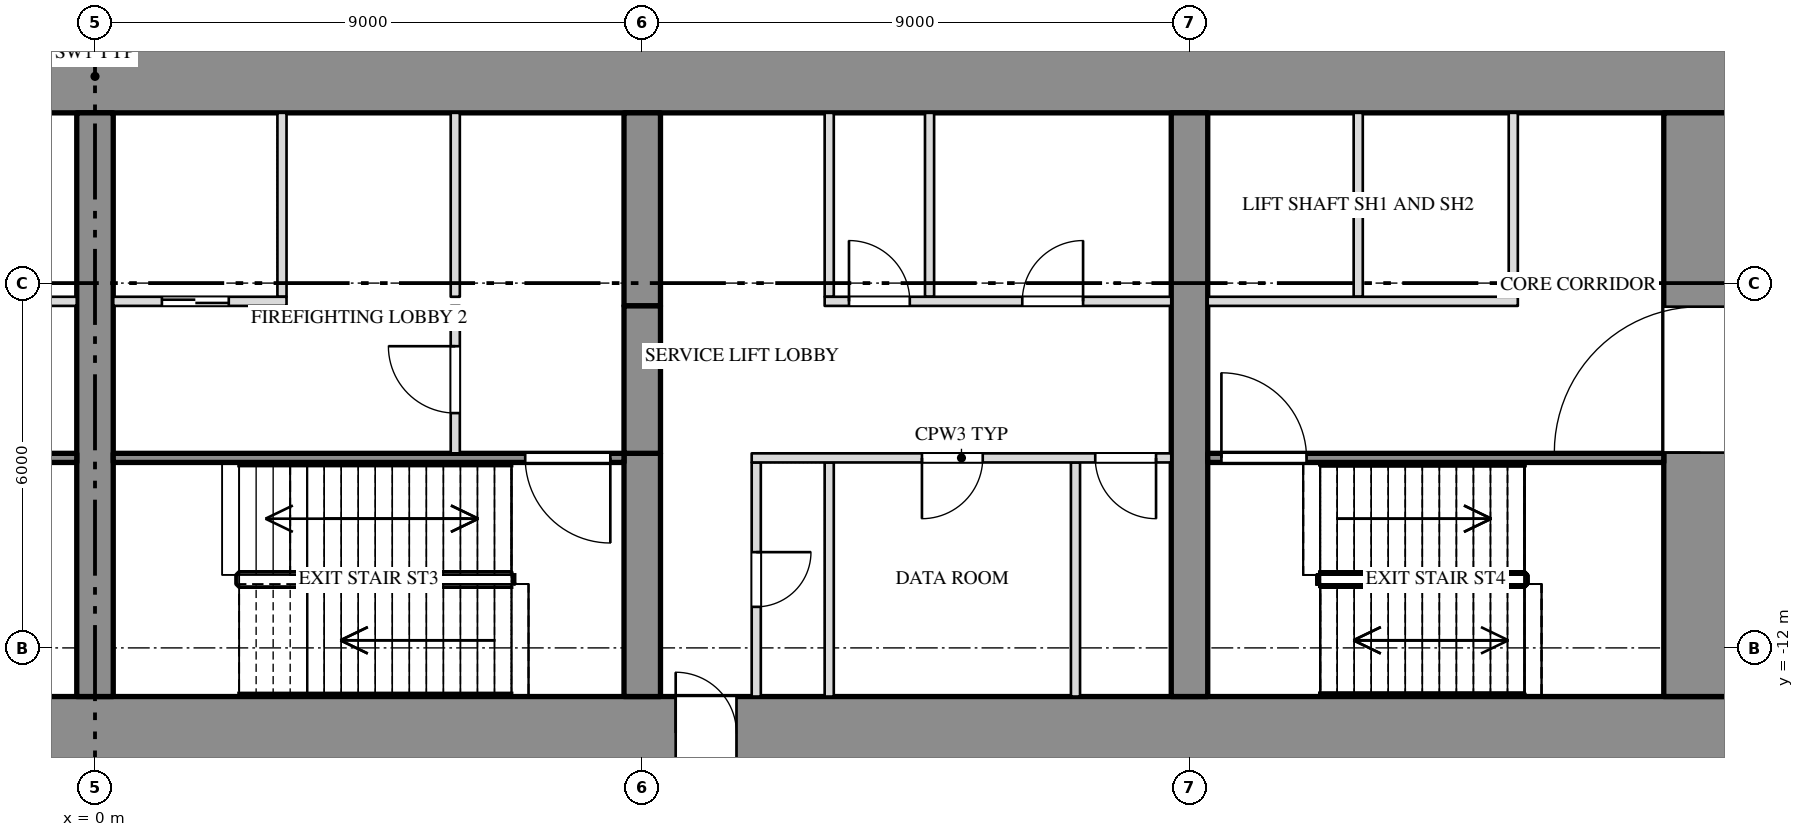
"""IFC4 building model, lengths in metres.
Left out: names, types, materials, properties, quantities, classifications, styles, units other than length and angle.
Written with IfcOpenShell. Run it as: python <this file> out.ifc"""

import sys

from ifc_helpers import new_model, si_unit, direction, frame, frame_2d, origin, place, context, subcontext, project, spatial, rectangle, extrude, element, fill, save


model = new_model("IFC4")
c1 = context("Model", 3, precision=1e-05, world=origin(), true_north=direction((0.0, 1.0)))
c2 = subcontext(c1, "Body", "Model", "MODEL_VIEW")
j1 = project(units=[si_unit("LENGTHUNIT", "METRE"), si_unit("PLANEANGLEUNIT", "RADIAN")], contexts=[c1])
p1 = place(None, origin())
s1 = spatial("IfcSite", under=j1, at=p1, CompositionType="ELEMENT")
p2 = place(p1, origin())
s2 = spatial("IfcBuilding", under=s1, at=p2, CompositionType="ELEMENT")
p3 = place(p2, frame((0.0, 0.0, 9.0)))
s3 = spatial("IfcBuildingStorey", under=s2, at=p3, CompositionType="ELEMENT", Elevation=9.0)
p4 = place(p3, frame((-27.0, -2.6, 0.0), z_axis=(0.0, 0.0, 1.0), x_axis=(1.0, 0.0, 0.0)))
e1 = element("IfcWall", 1, at=p4, inside=s3, PredefinedType="SHEAR", context=c2, shape_type="SweptSolid", body=[
    extrude(rectangle(XDim=54.0, YDim=1.2, at=frame_2d((27.0, 0.0))), origin(), (0.0, 0.0, 1.0), 5.7),
])
p5 = place(p3, frame((-27.0, -13.4, 0.0), z_axis=(0.0, 0.0, 1.0), x_axis=(1.0, 0.0, 0.0)))
e2 = element("IfcWall", 2, at=p5, inside=s3, PredefinedType="SHEAR", context=c2, shape_type="SweptSolid", body=[
    extrude(rectangle(XDim=54.0, YDim=1.2, at=frame_2d((27.0, 0.0))), origin(), (0.0, 0.0, 1.0), 5.7),
])
p6 = place(p5, frame((16.45, 0.0, 0.0)))
e3 = element("IfcOpeningElement", 3, at=p6, cuts=e2, PredefinedType="OPENING", context=c2, shape_type="SweptSolid", body=[
    extrude(rectangle(XDim=1.0, YDim=2.1, at=frame_2d((0.5, 1.05))), frame((0.0, 0.612, 0.0), z_axis=(0.0, -1.0, 0.0), x_axis=(1.0, 0.0, 0.0)), (0.0, 0.0, 1.0), 1.224),
])
p7 = place(p5, frame((36.55, 0.0, 0.0)))
e4 = element("IfcOpeningElement", 4, at=p7, cuts=e2, PredefinedType="OPENING", context=c2, shape_type="SweptSolid", body=[
    extrude(rectangle(XDim=1.0, YDim=2.1, at=frame_2d((0.5, 1.05))), frame((0.0, 0.612, 0.0), z_axis=(0.0, -1.0, 0.0), x_axis=(1.0, 0.0, 0.0)), (0.0, 0.0, 1.0), 1.224),
])
p8 = place(p3, frame((26.4, -12.8, 0.0), z_axis=(0.0, 0.0, 1.0), x_axis=(0.0, 1.0, 0.0)))
e5 = element("IfcWall", 5, at=p8, inside=s3, PredefinedType="SHEAR", context=c2, shape_type="SweptSolid", body=[
    extrude(rectangle(XDim=9.6, YDim=1.2, at=frame_2d((4.8, 0.0))), origin(), (0.0, 0.0, 1.0), 5.7),
])
p9 = place(p8, frame((4.012, 0.0, 0.0)))
e6 = element("IfcOpeningElement", 6, at=p9, cuts=e5, PredefinedType="OPENING", context=c2, shape_type="SweptSolid", body=[
    extrude(rectangle(XDim=2.4, YDim=2.1, at=frame_2d((1.2, 1.05))), frame((0.0, 0.612, 0.0), z_axis=(0.0, -1.0, 0.0), x_axis=(1.0, 0.0, 0.0)), (0.0, 0.0, 1.0), 1.224),
])
p10 = place(p3, frame((0.0, -12.8, 0.0), z_axis=(0.0, 0.0, 1.0), x_axis=(0.0, 1.0, 0.0)))
e7 = element("IfcWall", 7, at=p10, inside=s3, PredefinedType="SHEAR", context=c2, shape_type="SweptSolid", body=[
    extrude(rectangle(XDim=9.6, YDim=0.6, at=frame_2d((4.8, 0.0))), origin(), (0.0, 0.0, 1.0), 5.7),
])
p11 = place(p3, frame((9.0, -12.8, 0.0), z_axis=(0.0, 0.0, 1.0), x_axis=(0.0, 1.0, 0.0)))
e8 = element("IfcWall", 8, at=p11, inside=s3, PredefinedType="SHEAR", context=c2, shape_type="SweptSolid", body=[
    extrude(rectangle(XDim=4.0, YDim=0.6, at=frame_2d((2.0, 0.0))), origin(), (0.0, 0.0, 1.0), 5.7),
])
p12 = place(p3, frame((9.0, -6.375, 0.0), z_axis=(0.0, 0.0, 1.0), x_axis=(0.0, 1.0, 0.0)))
e9 = element("IfcWall", 9, at=p12, inside=s3, PredefinedType="SHEAR", context=c2, shape_type="SweptSolid", body=[
    extrude(rectangle(XDim=3.175, YDim=0.6, at=frame_2d((1.587, 0.0))), origin(), (0.0, 0.0, 1.0), 5.7),
])
p13 = place(p3, frame((9.0, -8.8, 3.6), z_axis=(0.0, 0.0, 1.0), x_axis=(0.0, 1.0, 0.0)))
e10 = element("IfcWall", 10, at=p13, inside=s3, PredefinedType="SHEAR", context=c2, shape_type="SweptSolid", body=[
    extrude(rectangle(XDim=2.425, YDim=0.6, at=frame_2d((1.212, 0.0))), origin(), (0.0, 0.0, 1.0), 2.1),
])
p14 = place(p3, frame((18.0, -12.8, 0.0), z_axis=(0.0, 0.0, 1.0), x_axis=(0.0, 1.0, 0.0)))
e11 = element("IfcWall", 11, at=p14, inside=s3, PredefinedType="SHEAR", context=c2, shape_type="SweptSolid", body=[
    extrude(rectangle(XDim=9.6, YDim=0.6, at=frame_2d((4.8, 0.0))), origin(), (0.0, 0.0, 1.0), 5.7),
])
for number, where, z_axis, x_axis in (
    (12, (3.075, -6.225, 0.0), (0.0, 0.0, 1.0), (0.0, 1.0, 0.0)),
    (13, (5.925, -6.225, 0.0), (0.0, 0.0, 1.0), (0.0, 1.0, 0.0)),
    (14, (12.075, -6.225, 0.0), (0.0, 0.0, 1.0), (0.0, 1.0, 0.0)),
    (15, (13.725, -6.225, 0.0), (0.0, 0.0, 1.0), (0.0, 1.0, 0.0)),
    (16, (20.775, -6.225, 0.0), (0.0, 0.0, 1.0), (0.0, 1.0, 0.0)),
    (17, (23.325, -6.225, 0.0), (0.0, 0.0, 1.0), (0.0, 1.0, 0.0)),
):
    element("IfcWall", number, at=place(p3, frame(where, z_axis=z_axis, x_axis=x_axis)), inside=s3, PredefinedType="PARTITIONING", context=c2, shape_type="SweptSolid", body=[
        extrude(rectangle(XDim=3.025, YDim=0.15, at=frame_2d((1.513, 0.0))), origin(), (0.0, 0.0, 1.0), 5.7),
    ])
p15 = place(p3, frame((10.875, -12.8, 0.0), z_axis=(0.0, 0.0, 1.0), x_axis=(0.0, 1.0, 0.0)))
e18 = element("IfcWall", 18, at=p15, inside=s3, PredefinedType="PARTITIONING", context=c2, shape_type="SweptSolid", body=[
    extrude(rectangle(XDim=3.85, YDim=0.15, at=frame_2d((1.925, 0.0))), origin(), (0.0, 0.0, 1.0), 5.7),
])
p16 = place(p15, frame((1.475, 0.0, 0.0)))
e19 = element("IfcOpeningElement", 19, at=p16, cuts=e18, PredefinedType="OPENING", context=c2, shape_type="SweptSolid", body=[
    extrude(rectangle(XDim=0.9, YDim=2.1, at=frame_2d((0.45, 1.05))), frame((0.0, 0.087, 0.0), z_axis=(0.0, -1.0, 0.0), x_axis=(1.0, 0.0, 0.0)), (0.0, 0.0, 1.0), 0.174),
])
for number, where, z_axis, x_axis in (
    (20, (12.075, -12.8, 0.0), (0.0, 0.0, 1.0), (0.0, 1.0, 0.0)),
    (21, (16.125, -12.8, 0.0), (0.0, 0.0, 1.0), (0.0, 1.0, 0.0)),
):
    element("IfcWall", number, at=place(p3, frame(where, z_axis=z_axis, x_axis=x_axis)), inside=s3, PredefinedType="PARTITIONING", context=c2, shape_type="SweptSolid", body=[
        extrude(rectangle(XDim=3.85, YDim=0.15, at=frame_2d((1.925, 0.0))), origin(), (0.0, 0.0, 1.0), 5.7),
    ])
p17 = place(p3, frame((5.925, -8.8, 0.0), z_axis=(0.0, 0.0, 1.0), x_axis=(0.0, 1.0, 0.0)))
e22 = element("IfcWall", 22, at=p17, inside=s3, PredefinedType="PARTITIONING", context=c2, shape_type="SweptSolid", body=[
    extrude(rectangle(XDim=2.425, YDim=0.15, at=frame_2d((1.212, 0.0))), origin(), (0.0, 0.0, 1.0), 5.7),
])
p18 = place(p17, frame((0.662, 0.0, 0.0)))
e23 = element("IfcOpeningElement", 23, at=p18, cuts=e22, PredefinedType="OPENING", context=c2, shape_type="SweptSolid", body=[
    extrude(rectangle(XDim=1.1, YDim=2.1, at=frame_2d((0.55, 1.05))), frame((0.0, 0.087, 0.0), z_axis=(0.0, -1.0, 0.0), x_axis=(1.0, 0.0, 0.0)), (0.0, 0.0, 1.0), 0.174),
])
p19 = place(p3, frame((-3.15, -6.3, 0.0), z_axis=(0.0, 0.0, 1.0), x_axis=(1.0, 0.0, 0.0)))
e24 = element("IfcWall", 24, at=p19, inside=s3, PredefinedType="PARTITIONING", context=c2, shape_type="SweptSolid", body=[
    extrude(rectangle(XDim=2.85, YDim=0.15, at=frame_2d((1.425, 0.0))), origin(), (0.0, 0.0, 1.0), 5.7),
])
p20 = place(p19, frame((0.95, 0.0, 0.0)))
e25 = element("IfcOpeningElement", 25, at=p20, cuts=e24, PredefinedType="OPENING", context=c2, shape_type="SweptSolid", body=[
    extrude(rectangle(XDim=1.1, YDim=2.1, at=frame_2d((0.55, 1.05))), frame((0.0, 0.087, 0.0), z_axis=(0.0, -1.0, 0.0), x_axis=(1.0, 0.0, 0.0)), (0.0, 0.0, 1.0), 0.174),
])
p21 = place(p3, frame((0.3, -6.3, 0.0), z_axis=(0.0, 0.0, 1.0), x_axis=(1.0, 0.0, 0.0)))
e26 = element("IfcWall", 26, at=p21, inside=s3, PredefinedType="PARTITIONING", context=c2, shape_type="SweptSolid", body=[
    extrude(rectangle(XDim=2.85, YDim=0.15, at=frame_2d((1.425, 0.0))), origin(), (0.0, 0.0, 1.0), 5.7),
])
p22 = place(p21, frame((0.8, 0.0, 0.0)))
e27 = element("IfcOpeningElement", 27, at=p22, cuts=e26, PredefinedType="OPENING", context=c2, shape_type="SweptSolid", body=[
    extrude(rectangle(XDim=1.1, YDim=2.1, at=frame_2d((0.55, 1.05))), frame((0.0, 0.087, 0.0), z_axis=(0.0, -1.0, 0.0), x_axis=(1.0, 0.0, 0.0)), (0.0, 0.0, 1.0), 0.174),
])
p23 = place(p3, frame((12.0, -6.3, 0.0), z_axis=(0.0, 0.0, 1.0), x_axis=(1.0, 0.0, 0.0)))
e28 = element("IfcWall", 28, at=p23, inside=s3, PredefinedType="PARTITIONING", context=c2, shape_type="SweptSolid", body=[
    extrude(rectangle(XDim=5.7, YDim=0.15, at=frame_2d((2.85, 0.0))), origin(), (0.0, 0.0, 1.0), 5.7),
])
p24 = place(p23, frame((0.4, 0.0, 0.0)))
e29 = element("IfcOpeningElement", 29, at=p24, cuts=e28, PredefinedType="OPENING", context=c2, shape_type="SweptSolid", body=[
    extrude(rectangle(XDim=1.0, YDim=2.1, at=frame_2d((0.5, 1.05))), frame((0.0, 0.087, 0.0), z_axis=(0.0, -1.0, 0.0), x_axis=(1.0, 0.0, 0.0)), (0.0, 0.0, 1.0), 0.174),
])
p25 = place(p23, frame((3.25, 0.0, 0.0)))
e30 = element("IfcOpeningElement", 30, at=p25, cuts=e28, PredefinedType="OPENING", context=c2, shape_type="SweptSolid", body=[
    extrude(rectangle(XDim=1.0, YDim=2.1, at=frame_2d((0.5, 1.05))), frame((0.0, 0.087, 0.0), z_axis=(0.0, -1.0, 0.0), x_axis=(1.0, 0.0, 0.0)), (0.0, 0.0, 1.0), 0.174),
])
p26 = place(p3, frame((18.3, -6.3, 0.0), z_axis=(0.0, 0.0, 1.0), x_axis=(1.0, 0.0, 0.0)))
e31 = element("IfcWall", 31, at=p26, inside=s3, PredefinedType="PARTITIONING", context=c2, shape_type="SweptSolid", body=[
    extrude(rectangle(XDim=5.1, YDim=0.15, at=frame_2d((2.55, 0.0))), origin(), (0.0, 0.0, 1.0), 5.7),
])
p27 = place(p3, frame((-8.7, -8.875, 0.0), z_axis=(0.0, 0.0, 1.0), x_axis=(1.0, 0.0, 0.0)))
e32 = element("IfcWall", 32, at=p27, inside=s3, PredefinedType="SHEAR", context=c2, shape_type="SweptSolid", body=[
    extrude(rectangle(XDim=8.4, YDim=0.15, at=frame_2d((4.2, 0.0))), origin(), (0.0, 0.0, 1.0), 5.7),
])
p28 = place(p27, frame((0.225, 0.0, 0.0)))
e33 = element("IfcOpeningElement", 33, at=p28, cuts=e32, PredefinedType="OPENING", context=c2, shape_type="SweptSolid", body=[
    extrude(rectangle(XDim=1.4, YDim=2.1, at=frame_2d((0.7, 1.05))), frame((0.0, 0.087, 0.0), z_axis=(0.0, -1.0, 0.0), x_axis=(1.0, 0.0, 0.0)), (0.0, 0.0, 1.0), 0.174),
])
p29 = place(p3, frame((0.3, -8.875, 0.0), z_axis=(0.0, 0.0, 1.0), x_axis=(1.0, 0.0, 0.0)))
e34 = element("IfcWall", 34, at=p29, inside=s3, PredefinedType="SHEAR", context=c2, shape_type="SweptSolid", body=[
    extrude(rectangle(XDim=8.4, YDim=0.15, at=frame_2d((4.2, 0.0))), origin(), (0.0, 0.0, 1.0), 5.7),
])
p30 = place(p29, frame((6.775, 0.0, 0.0)))
e35 = element("IfcOpeningElement", 35, at=p30, cuts=e34, PredefinedType="OPENING", context=c2, shape_type="SweptSolid", body=[
    extrude(rectangle(XDim=1.4, YDim=2.1, at=frame_2d((0.7, 1.05))), frame((0.0, 0.087, 0.0), z_axis=(0.0, -1.0, 0.0), x_axis=(1.0, 0.0, 0.0)), (0.0, 0.0, 1.0), 0.174),
])
p31 = place(p3, frame((10.8, -8.875, 0.0), z_axis=(0.0, 0.0, 1.0), x_axis=(1.0, 0.0, 0.0)))
e36 = element("IfcWall", 36, at=p31, inside=s3, PredefinedType="PARTITIONING", context=c2, shape_type="SweptSolid", body=[
    extrude(rectangle(XDim=6.9, YDim=0.15, at=frame_2d((3.45, 0.0))), origin(), (0.0, 0.0, 1.0), 5.7),
])
p32 = place(p31, frame((2.8, 0.0, 0.0)))
e37 = element("IfcOpeningElement", 37, at=p32, cuts=e36, PredefinedType="OPENING", context=c2, shape_type="SweptSolid", body=[
    extrude(rectangle(XDim=1.0, YDim=2.1, at=frame_2d((0.5, 1.05))), frame((0.0, 0.087, 0.0), z_axis=(0.0, -1.0, 0.0), x_axis=(1.0, 0.0, 0.0)), (0.0, 0.0, 1.0), 0.174),
])
p33 = place(p31, frame((5.65, 0.0, 0.0)))
e38 = element("IfcOpeningElement", 38, at=p33, cuts=e36, PredefinedType="OPENING", context=c2, shape_type="SweptSolid", body=[
    extrude(rectangle(XDim=1.0, YDim=2.1, at=frame_2d((0.5, 1.05))), frame((0.0, 0.087, 0.0), z_axis=(0.0, -1.0, 0.0), x_axis=(1.0, 0.0, 0.0)), (0.0, 0.0, 1.0), 0.174),
])
p34 = place(p3, frame((18.3, -8.875, 0.0), z_axis=(0.0, 0.0, 1.0), x_axis=(1.0, 0.0, 0.0)))
e39 = element("IfcWall", 39, at=p34, inside=s3, PredefinedType="SHEAR", context=c2, shape_type="SweptSolid", body=[
    extrude(rectangle(XDim=7.5, YDim=0.15, at=frame_2d((3.75, 0.0))), origin(), (0.0, 0.0, 1.0), 5.7),
])
p35 = place(p34, frame((0.225, 0.0, 0.0)))
e40 = element("IfcOpeningElement", 40, at=p35, cuts=e39, PredefinedType="OPENING", context=c2, shape_type="SweptSolid", body=[
    extrude(rectangle(XDim=1.4, YDim=2.1, at=frame_2d((0.7, 1.05))), frame((0.0, 0.087, 0.0), z_axis=(0.0, -1.0, 0.0), x_axis=(1.0, 0.0, 0.0)), (0.0, 0.0, 1.0), 0.174),
])
p36 = place(p22, origin())
e41 = element("IfcDoor", 41, at=p36, inside=s3, OperationType="SLIDING_TO_RIGHT", PredefinedType="DOOR", context=c2, shape_type="SweptSolid", body=[
    extrude(rectangle(XDim=1.1, YDim=2.1, at=frame_2d((0.55, 1.05))), frame((0.0, 0.025, 0.0), z_axis=(0.0, -1.0, 0.0), x_axis=(1.0, 0.0, 0.0)), (0.0, 0.0, 1.0), 0.05),
])
fill(e27, e41)
p37 = place(p18, origin())
e42 = element("IfcDoor", 42, at=p37, inside=s3, OperationType="SINGLE_SWING_RIGHT", PredefinedType="DOOR", context=c2, shape_type="SweptSolid", body=[
    extrude(rectangle(XDim=1.1, YDim=2.1, at=frame_2d((0.55, 1.05))), frame((0.0, 0.025, 0.0), z_axis=(0.0, -1.0, 0.0), x_axis=(1.0, 0.0, 0.0)), (0.0, 0.0, 1.0), 0.05),
])
fill(e23, e42)
p38 = place(p30, origin())
e43 = element("IfcDoor", 43, at=p38, inside=s3, OperationType="DOUBLE_DOOR_SINGLE_SWING", PredefinedType="DOOR", context=c2, shape_type="SweptSolid", body=[
    extrude(rectangle(XDim=1.4, YDim=2.1, at=frame_2d((0.7, 1.05))), frame((0.0, 0.025, 0.0), z_axis=(0.0, -1.0, 0.0), x_axis=(1.0, 0.0, 0.0)), (0.0, 0.0, 1.0), 0.05),
])
fill(e35, e43)
p39 = place(p7, origin())
e44 = element("IfcDoor", 44, at=p39, inside=s3, OperationType="SINGLE_SWING_LEFT", PredefinedType="DOOR", context=c2, shape_type="SweptSolid", body=[
    extrude(rectangle(XDim=1.0, YDim=2.1, at=frame_2d((0.5, 1.05))), frame((0.0, 0.025, 0.0), z_axis=(0.0, -1.0, 0.0), x_axis=(1.0, 0.0, 0.0)), (0.0, 0.0, 1.0), 0.05),
])
fill(e4, e44)
p40 = place(p16, origin())
e45 = element("IfcDoor", 45, at=p40, inside=s3, OperationType="SINGLE_SWING_LEFT", PredefinedType="DOOR", context=c2, shape_type="SweptSolid", body=[
    extrude(rectangle(XDim=0.9, YDim=2.1, at=frame_2d((0.45, 1.05))), frame((0.0, 0.025, 0.0), z_axis=(0.0, -1.0, 0.0), x_axis=(1.0, 0.0, 0.0)), (0.0, 0.0, 1.0), 0.05),
])
fill(e19, e45)
p41 = place(p24, origin())
e46 = element("IfcDoor", 46, at=p41, inside=s3, OperationType="SINGLE_SWING_LEFT", PredefinedType="DOOR", context=c2, shape_type="SweptSolid", body=[
    extrude(rectangle(XDim=1.0, YDim=2.1, at=frame_2d((0.5, 1.05))), frame((0.0, 0.025, 0.0), z_axis=(0.0, -1.0, 0.0), x_axis=(1.0, 0.0, 0.0)), (0.0, 0.0, 1.0), 0.05),
])
fill(e29, e46)
p42 = place(p32, origin())
e47 = element("IfcDoor", 47, at=p42, inside=s3, OperationType="SINGLE_SWING_RIGHT", PredefinedType="DOOR", context=c2, shape_type="SweptSolid", body=[
    extrude(rectangle(XDim=1.0, YDim=2.1, at=frame_2d((0.5, 1.05))), frame((0.0, 0.025, 0.0), z_axis=(0.0, -1.0, 0.0), x_axis=(1.0, 0.0, 0.0)), (0.0, 0.0, 1.0), 0.05),
])
fill(e37, e47)
p43 = place(p25, origin())
e48 = element("IfcDoor", 48, at=p43, inside=s3, OperationType="SINGLE_SWING_RIGHT", PredefinedType="DOOR", context=c2, shape_type="SweptSolid", body=[
    extrude(rectangle(XDim=1.0, YDim=2.1, at=frame_2d((0.5, 1.05))), frame((0.0, 0.025, 0.0), z_axis=(0.0, -1.0, 0.0), x_axis=(1.0, 0.0, 0.0)), (0.0, 0.0, 1.0), 0.05),
])
fill(e30, e48)
p44 = place(p33, origin())
e49 = element("IfcDoor", 49, at=p44, inside=s3, OperationType="SINGLE_SWING_LEFT", PredefinedType="DOOR", context=c2, shape_type="SweptSolid", body=[
    extrude(rectangle(XDim=1.0, YDim=2.1, at=frame_2d((0.5, 1.05))), frame((0.0, 0.025, 0.0), z_axis=(0.0, -1.0, 0.0), x_axis=(1.0, 0.0, 0.0)), (0.0, 0.0, 1.0), 0.05),
])
fill(e38, e49)
p45 = place(p35, origin())
e50 = element("IfcDoor", 50, at=p45, inside=s3, OperationType="DOUBLE_DOOR_SINGLE_SWING", PredefinedType="DOOR", context=c2, shape_type="SweptSolid", body=[
    extrude(rectangle(XDim=1.4, YDim=2.1, at=frame_2d((0.7, 1.05))), frame((0.0, 0.025, 0.0), z_axis=(0.0, -1.0, 0.0), x_axis=(1.0, 0.0, 0.0)), (0.0, 0.0, 1.0), 0.05),
])
fill(e40, e50)
p46 = place(p9, origin())
e51 = element("IfcDoor", 51, at=p46, inside=s3, OperationType="DOUBLE_DOOR_SINGLE_SWING", PredefinedType="DOOR", context=c2, shape_type="SweptSolid", body=[
    extrude(rectangle(XDim=2.4, YDim=2.1, at=frame_2d((1.2, 1.05))), frame((0.0, 0.025, 0.0), z_axis=(0.0, -1.0, 0.0), x_axis=(1.0, 0.0, 0.0)), (0.0, 0.0, 1.0), 0.05),
])
fill(e6, e51)
save(model, sys.argv[1])
